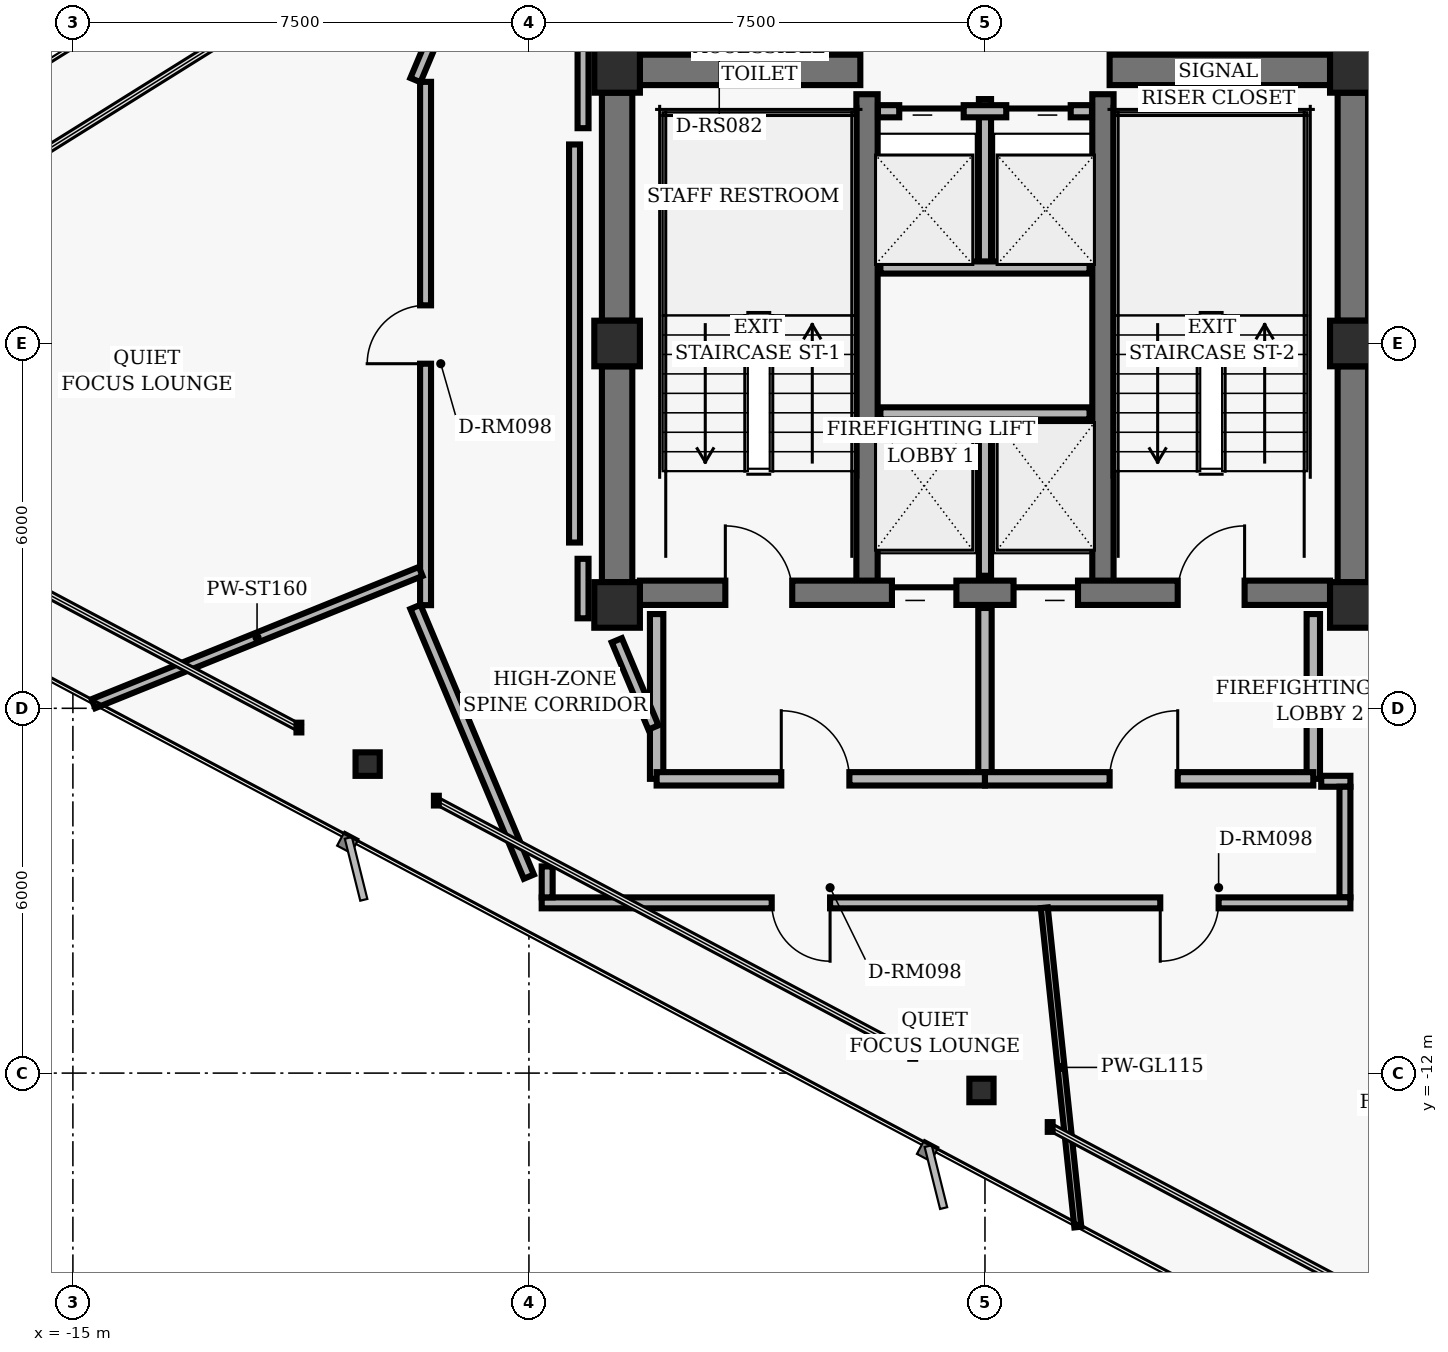
"""IFC4 building model, lengths in metres.
Left out: names, types, materials, properties, quantities, classifications, styles, units other than length and angle.
Written with IfcOpenShell. Run it as: python <this file> out.ifc"""

import sys

from ifc_helpers import new_model, si_unit, direction, frame, frame_2d, origin, origin_2d, place, context, subcontext, project, spatial, rectangle, hollow_rectangle, i_section, extrude, element, fill, save


model = new_model("IFC4")
c1 = context("Model", 3, precision=1e-05, world=origin(), true_north=direction((0.0, 1.0)))
c2 = subcontext(c1, "Body", "Model", "MODEL_VIEW")
j1 = project(units=[si_unit("LENGTHUNIT", "METRE"), si_unit("PLANEANGLEUNIT", "RADIAN")], contexts=[c1])
p1 = place(None, origin())
s1 = spatial("IfcSite", under=j1, at=p1, CompositionType="ELEMENT")
p2 = place(p1, origin())
s2 = spatial("IfcBuilding", under=s1, at=p2, CompositionType="ELEMENT")
p3 = place(p2, frame((0.0, 0.0, 202.72)))
s3 = spatial("IfcBuildingStorey", under=s2, at=p3, CompositionType="ELEMENT", Elevation=202.72)
for number, where, z_axis, x_axis in (
    (1, (-6.05, 4.5, 0.0), (0.0, 0.0, 1.0), (1.0, 0.0, 0.0)),
    (2, (6.05, 4.5, 0.0), (0.0, 0.0, 1.0), (1.0, 0.0, 0.0)),
    (3, (-6.05, 0.0, 0.0), (0.0, 0.0, 1.0), (1.0, 0.0, 0.0)),
    (4, (6.05, 0.0, 0.0), (0.0, 0.0, 1.0), (1.0, 0.0, 0.0)),
    (5, (-6.05, -4.3, 0.0), (0.0, 0.0, 1.0), (1.0, 0.0, 0.0)),
    (6, (6.05, -4.3, 0.0), (0.0, 0.0, 1.0), (1.0, 0.0, 0.0)),
):
    element("IfcColumn", number, at=place(p3, frame(where, z_axis=z_axis, x_axis=x_axis)), inside=s3, PredefinedType="COLUMN", context=c2, shape_type="SweptSolid", body=[
        extrude(hollow_rectangle(XDim=0.75, YDim=0.75, WallThickness=0.05, InnerFilletRadius=0.02, OuterFilletRadius=0.04, at=origin_2d()), origin(), (0.0, 0.0, 1.0), 3.04),
    ])
p4 = place(p3, frame((-6.05, 0.375, 0.0), z_axis=(0.0, 0.0, 1.0), x_axis=(0.0, 1.0, 0.0)))
e7 = element("IfcWall", 7, at=p4, inside=s3, PredefinedType="SHEAR", context=c2, shape_type="SweptSolid", body=[
    extrude(rectangle(XDim=3.75, YDim=0.5, at=frame_2d((1.875, 0.0))), origin(), (0.0, 0.0, 1.0), 2.798),
])
p5 = place(p3, frame((-6.05, -3.925, 0.0), z_axis=(0.0, 0.0, 1.0), x_axis=(0.0, 1.0, 0.0)))
e8 = element("IfcWall", 8, at=p5, inside=s3, PredefinedType="SHEAR", context=c2, shape_type="SweptSolid", body=[
    extrude(rectangle(XDim=3.55, YDim=0.5, at=frame_2d((1.775, 0.0))), origin(), (0.0, 0.0, 1.0), 2.798),
])
p6 = place(p3, frame((6.05, 0.375, 0.0), z_axis=(0.0, 0.0, 1.0), x_axis=(0.0, 1.0, 0.0)))
e9 = element("IfcWall", 9, at=p6, inside=s3, PredefinedType="SHEAR", context=c2, shape_type="SweptSolid", body=[
    extrude(rectangle(XDim=3.75, YDim=0.5, at=frame_2d((1.875, 0.0))), origin(), (0.0, 0.0, 1.0), 2.798),
])
p7 = place(p3, frame((6.05, -3.925, 0.0), z_axis=(0.0, 0.0, 1.0), x_axis=(0.0, 1.0, 0.0)))
e10 = element("IfcWall", 10, at=p7, inside=s3, PredefinedType="SHEAR", context=c2, shape_type="SweptSolid", body=[
    extrude(rectangle(XDim=3.55, YDim=0.5, at=frame_2d((1.775, 0.0))), origin(), (0.0, 0.0, 1.0), 2.798),
])
for number, where, z_axis, x_axis in (
    (11, (-1.94, -4.1, 0.0), (0.0, 0.0, 1.0), (0.0, 1.0, 0.0)),
    (12, (1.94, -4.1, 0.0), (0.0, 0.0, 1.0), (0.0, 1.0, 0.0)),
):
    element("IfcWall", number, at=place(p3, frame(where, z_axis=z_axis, x_axis=x_axis)), inside=s3, PredefinedType="SHEAR", context=c2, shape_type="SweptSolid", body=[
        extrude(rectangle(XDim=8.2, YDim=0.35, at=frame_2d((4.1, 0.0))), origin(), (0.0, 0.0, 1.0), 2.798),
    ])
p8 = place(p3, frame((-5.675, -4.1, 0.0), z_axis=(0.0, 0.0, 1.0), x_axis=(1.0, 0.0, 0.0)))
e13 = element("IfcWall", 13, at=p8, inside=s3, PredefinedType="SHEAR", context=c2, shape_type="SweptSolid", body=[
    extrude(rectangle(XDim=11.35, YDim=0.4, at=frame_2d((5.675, 0.0))), origin(), (0.0, 0.0, 1.0), 2.798),
])
p9 = place(p8, frame((1.405, 0.0, 0.0)))
e14 = element("IfcOpeningElement", 14, at=p9, cuts=e13, PredefinedType="OPENING", context=c2, shape_type="SweptSolid", body=[
    extrude(rectangle(XDim=1.1, YDim=2.04, at=frame_2d((0.55, 1.02))), frame((0.0, 0.21, 0.0), z_axis=(0.0, -1.0, 0.0), x_axis=(1.0, 0.0, 0.0)), (0.0, 0.0, 1.0), 0.42),
])
p10 = place(p8, frame((8.845, 0.0, 0.0)))
e15 = element("IfcOpeningElement", 15, at=p10, cuts=e13, PredefinedType="OPENING", context=c2, shape_type="SweptSolid", body=[
    extrude(rectangle(XDim=1.1, YDim=2.04, at=frame_2d((0.55, 1.02))), frame((0.0, 0.21, 0.0), z_axis=(0.0, -1.0, 0.0), x_axis=(1.0, 0.0, 0.0)), (0.0, 0.0, 1.0), 0.42),
])
p11 = place(p8, frame((4.145, 0.0, 0.0)))
e16 = element("IfcOpeningElement", 16, at=p11, cuts=e13, PredefinedType="OPENING", context=c2, shape_type="SweptSolid", body=[
    extrude(rectangle(XDim=1.06, YDim=2.04, at=frame_2d((0.53, 1.02))), frame((0.0, 0.21, 0.0), z_axis=(0.0, -1.0, 0.0), x_axis=(1.0, 0.0, 0.0)), (0.0, 0.0, 1.0), 0.42),
])
p12 = place(p8, frame((6.145, 0.0, 0.0)))
e17 = element("IfcOpeningElement", 17, at=p12, cuts=e13, PredefinedType="OPENING", context=c2, shape_type="SweptSolid", body=[
    extrude(rectangle(XDim=1.06, YDim=2.04, at=frame_2d((0.53, 1.02))), frame((0.0, 0.21, 0.0), z_axis=(0.0, -1.0, 0.0), x_axis=(1.0, 0.0, 0.0)), (0.0, 0.0, 1.0), 0.42),
])
for number, where, z_axis, x_axis in (
    (18, (-5.675, 4.5, 0.0), (0.0, 0.0, 1.0), (1.0, 0.0, 0.0)),
    (19, (2.05, 4.5, 0.0), (0.0, 0.0, 1.0), (1.0, 0.0, 0.0)),
):
    element("IfcWall", number, at=place(p3, frame(where, z_axis=z_axis, x_axis=x_axis)), inside=s3, PredefinedType="SHEAR", context=c2, shape_type="SweptSolid", body=[
        extrude(rectangle(XDim=3.625, YDim=0.5, at=frame_2d((1.812, 0.0))), origin(), (0.0, 0.0, 1.0), 2.798),
    ])
for number, where, z_axis, x_axis in (
    (20, (-10.153, -6.918, 0.0), (0.0, 0.0, 1.0), (1.0, 0.0, 0.0)),
    (21, (-0.058, -12.285, 0.0), (0.0, 0.0, 1.0), (1.0, 0.0, 0.0)),
):
    element("IfcColumn", number, at=place(p3, frame(where, z_axis=z_axis, x_axis=x_axis)), inside=s3, PredefinedType="COLUMN", context=c2, shape_type="SweptSolid", body=[
        extrude(i_section(OverallWidth=0.398, OverallDepth=0.387, WebThickness=0.021, FlangeThickness=0.033, FilletRadius=0.018, at=origin_2d()), origin(), (0.0, 0.0, 1.0), 3.04),
    ])
p13 = place(p3, frame((0.0, -3.82, 0.0), z_axis=(0.0, 0.0, 1.0), x_axis=(0.0, 1.0, 0.0)))
e22 = element("IfcWall", 22, at=p13, inside=s3, PredefinedType="PARTITIONING", context=c2, shape_type="SweptSolid", body=[
    extrude(rectangle(XDim=2.67, YDim=0.2, at=frame_2d((1.335, 0.0))), origin(), (0.0, 0.0, 1.0), 2.773),
])
p14 = place(p3, frame((-1.72, -1.15, 0.0), z_axis=(0.0, 0.0, 1.0), x_axis=(1.0, 0.0, 0.0)))
e23 = element("IfcWall", 23, at=p14, inside=s3, PredefinedType="PARTITIONING", context=c2, shape_type="SweptSolid", body=[
    extrude(rectangle(XDim=3.44, YDim=0.2, at=frame_2d((1.72, 0.0))), origin(), (0.0, 0.0, 1.0), 2.773),
])
for number, where, z_axis, x_axis in (
    (24, (-5.4, -7.16, 0.0), (0.0, 0.0, 1.0), (0.0, 1.0, 0.0)),
    (25, (5.4, -7.16, 0.0), (0.0, 0.0, 1.0), (0.0, 1.0, 0.0)),
):
    element("IfcWall", number, at=place(p3, frame(where, z_axis=z_axis, x_axis=x_axis)), inside=s3, PredefinedType="PARTITIONING", context=c2, shape_type="SweptSolid", body=[
        extrude(rectangle(XDim=2.71, YDim=0.22, at=frame_2d((1.355, 0.0))), origin(), (0.0, 0.0, 1.0), 2.773),
    ])
p15 = place(p3, frame((0.0, -7.16, 0.0), z_axis=(0.0, 0.0, 1.0), x_axis=(0.0, 1.0, 0.0)))
e26 = element("IfcWall", 26, at=p15, inside=s3, PredefinedType="PARTITIONING", context=c2, shape_type="SweptSolid", body=[
    extrude(rectangle(XDim=2.81, YDim=0.22, at=frame_2d((1.405, 0.0))), origin(), (0.0, 0.0, 1.0), 2.773),
])
p16 = place(p3, frame((-5.4, -7.16, 0.0), z_axis=(0.0, 0.0, 1.0), x_axis=(1.0, 0.0, 0.0)))
e27 = element("IfcWall", 27, at=p16, inside=s3, PredefinedType="PARTITIONING", context=c2, shape_type="SweptSolid", body=[
    extrude(rectangle(XDim=5.4, YDim=0.22, at=frame_2d((2.7, 0.0))), origin(), (0.0, 0.0, 1.0), 2.395),
])
p17 = place(p16, frame((2.05, 0.0, 0.0)))
e28 = element("IfcOpeningElement", 28, at=p17, cuts=e27, PredefinedType="OPENING", context=c2, shape_type="SweptSolid", body=[
    extrude(rectangle(XDim=1.12, YDim=2.02, at=frame_2d((0.56, 1.01))), frame((0.0, 0.12, 0.0), z_axis=(0.0, -1.0, 0.0), x_axis=(1.0, 0.0, 0.0)), (0.0, 0.0, 1.0), 0.24),
])
p18 = place(p3, frame((0.0, -7.16, 0.0), z_axis=(0.0, 0.0, 1.0), x_axis=(1.0, 0.0, 0.0)))
e29 = element("IfcWall", 29, at=p18, inside=s3, PredefinedType="PARTITIONING", context=c2, shape_type="SweptSolid", body=[
    extrude(rectangle(XDim=5.4, YDim=0.22, at=frame_2d((2.7, 0.0))), origin(), (0.0, 0.0, 1.0), 2.773),
])
p19 = place(p18, frame((2.05, 0.0, 0.0)))
e30 = element("IfcOpeningElement", 30, at=p19, cuts=e29, PredefinedType="OPENING", context=c2, shape_type="SweptSolid", body=[
    extrude(rectangle(XDim=1.12, YDim=2.02, at=frame_2d((0.56, 1.01))), frame((0.0, 0.12, 0.0), z_axis=(0.0, -1.0, 0.0), x_axis=(1.0, 0.0, 0.0)), (0.0, 0.0, 1.0), 0.24),
])
p20 = place(p3, frame((0.0, 1.25, 0.0), z_axis=(0.0, 0.0, 1.0), x_axis=(0.0, 1.0, 0.0)))
e31 = element("IfcWall", 31, at=p20, inside=s3, PredefinedType="PARTITIONING", context=c2, shape_type="SweptSolid", body=[
    extrude(rectangle(XDim=2.77, YDim=0.2, at=frame_2d((1.385, 0.0))), origin(), (0.0, 0.0, 1.0), 2.773),
])
p21 = place(p3, frame((-1.72, 1.25, 0.0), z_axis=(0.0, 0.0, 1.0), x_axis=(1.0, 0.0, 0.0)))
e32 = element("IfcWall", 32, at=p21, inside=s3, PredefinedType="PARTITIONING", context=c2, shape_type="SweptSolid", body=[
    extrude(rectangle(XDim=3.44, YDim=0.2, at=frame_2d((1.72, 0.0))), origin(), (0.0, 0.0, 1.0), 2.773),
])
p22 = place(p3, frame((-1.76, 3.82, 0.0), z_axis=(0.0, 0.0, 1.0), x_axis=(1.0, 0.0, 0.0)))
e33 = element("IfcWall", 33, at=p22, inside=s3, PredefinedType="PARTITIONING", context=c2, shape_type="SweptSolid", body=[
    extrude(rectangle(XDim=3.52, YDim=0.2, at=frame_2d((1.76, 0.0))), origin(), (0.0, 0.0, 1.0), 2.773),
])
p23 = place(p22, frame((0.35, 0.0, 0.0)))
e34 = element("IfcOpeningElement", 34, at=p23, cuts=e33, PredefinedType="OPENING", context=c2, shape_type="SweptSolid", body=[
    extrude(rectangle(XDim=1.06, YDim=2.04, at=frame_2d((0.53, 1.02))), frame((0.0, 0.11, 0.0), z_axis=(0.0, -1.0, 0.0), x_axis=(1.0, 0.0, 0.0)), (0.0, 0.0, 1.0), 0.22),
])
p24 = place(p22, frame((2.11, 0.0, 0.0)))
e35 = element("IfcOpeningElement", 35, at=p24, cuts=e33, PredefinedType="OPENING", context=c2, shape_type="SweptSolid", body=[
    extrude(rectangle(XDim=1.06, YDim=2.04, at=frame_2d((0.53, 1.02))), frame((0.0, 0.11, 0.0), z_axis=(0.0, -1.0, 0.0), x_axis=(1.0, 0.0, 0.0)), (0.0, 0.0, 1.0), 0.22),
])
p25 = place(p3, frame((-7.501, -8.769, 0.0), z_axis=(0.0, 0.0, 1.0), x_axis=(-0.387573945081, 0.921838617706, 0.0)))
e36 = element("IfcWall", 36, at=p25, inside=s3, PredefinedType="PARTITIONING", context=c2, shape_type="SweptSolid", body=[
    extrude(rectangle(XDim=4.813, YDim=0.18, at=frame_2d((2.407, 0.0))), origin(), (0.0, 0.0, 1.0), 2.773),
])
p26 = place(p3, frame((-9.2, -4.303, 0.0), z_axis=(0.0, 0.0, 1.0), x_axis=(0.0, 1.0, 0.0)))
e37 = element("IfcWall", 37, at=p26, inside=s3, PredefinedType="PARTITIONING", context=c2, shape_type="SweptSolid", body=[
    extrude(rectangle(XDim=8.607, YDim=0.18, at=frame_2d((4.303, 0.0))), origin(), (0.0, 0.0, 1.0), 2.773),
])
p27 = place(p26, frame((3.971, 0.0, 0.0)))
e38 = element("IfcOpeningElement", 38, at=p27, cuts=e37, PredefinedType="OPENING", context=c2, shape_type="SweptSolid", body=[
    extrude(rectangle(XDim=0.96, YDim=2.02, at=frame_2d((0.48, 1.01))), frame((0.0, 0.1, 0.0), z_axis=(0.0, -1.0, 0.0), x_axis=(1.0, 0.0, 0.0)), (0.0, 0.0, 1.0), 0.2),
])
p28 = place(p3, frame((-9.367, 4.332, 0.0), z_axis=(0.0, 0.0, 1.0), x_axis=(0.387573945081, 0.921838617706, 0.0)))
e39 = element("IfcWall", 39, at=p28, inside=s3, PredefinedType="PARTITIONING", context=c2, shape_type="SweptSolid", body=[
    extrude(rectangle(XDim=4.813, YDim=0.18, at=frame_2d((2.407, 0.0))), origin(), (0.0, 0.0, 1.0), 2.773),
])
p29 = place(p3, frame((-6.61, 4.94, 0.0), z_axis=(0.0, 0.0, 1.0), x_axis=(0.0, -1.0, 0.0)))
e40 = element("IfcWall", 40, at=p29, inside=s3, PredefinedType="PARTITIONING", context=c2, shape_type="SweptSolid", body=[
    extrude(rectangle(XDim=1.399, YDim=0.18, at=frame_2d((0.699, 0.0))), origin(), (0.0, 0.0, 1.0), 2.773),
])
p30 = place(p3, frame((-6.75, 3.273, 0.0), z_axis=(0.0, 0.0, 1.0), x_axis=(0.0, -1.0, 0.0)))
e41 = element("IfcWall", 41, at=p30, inside=s3, PredefinedType="PARTITIONING", context=c2, shape_type="SweptSolid", body=[
    extrude(rectangle(XDim=6.547, YDim=0.18, at=frame_2d((3.273, 0.0))), origin(), (0.0, 0.0, 1.0), 2.773),
])
p31 = place(p3, frame((-6.61, -3.541, 0.0), z_axis=(0.0, 0.0, 1.0), x_axis=(0.0, -1.0, 0.0)))
e42 = element("IfcWall", 42, at=p31, inside=s3, PredefinedType="PARTITIONING", context=c2, shape_type="SweptSolid", body=[
    extrude(rectangle(XDim=0.979, YDim=0.18, at=frame_2d((0.489, 0.0))), origin(), (0.0, 0.0, 1.0), 2.773),
])
p32 = place(p3, frame((-6.055, -4.882, 0.0), z_axis=(0.0, 0.0, 1.0), x_axis=(0.387579540458, -0.921836265189, 0.0)))
e43 = element("IfcWall", 43, at=p32, inside=s3, PredefinedType="PARTITIONING", context=c2, shape_type="SweptSolid", body=[
    extrude(rectangle(XDim=1.555, YDim=0.18, at=frame_2d((0.777, 0.0))), origin(), (0.0, 0.0, 1.0), 2.253),
])
p33 = place(p3, frame((5.53, -7.2, 0.0), z_axis=(0.0, 0.0, 1.0), x_axis=(1.0, 0.0, 0.0)))
e44 = element("IfcWall", 44, at=p33, inside=s3, PredefinedType="PARTITIONING", context=c2, shape_type="SweptSolid", body=[
    extrude(rectangle(XDim=0.48, YDim=0.18, at=frame_2d((0.24, 0.0))), origin(), (0.0, 0.0, 1.0), 2.773),
])
p34 = place(p3, frame((5.92, -7.29, 0.0), z_axis=(0.0, 0.0, 1.0), x_axis=(0.0, -1.0, 0.0)))
e45 = element("IfcWall", 45, at=p34, inside=s3, PredefinedType="PARTITIONING", context=c2, shape_type="SweptSolid", body=[
    extrude(rectangle(XDim=1.82, YDim=0.18, at=frame_2d((0.91, 0.0))), origin(), (0.0, 0.0, 1.0), 2.773),
])
p35 = place(p3, frame((6.01, -9.2, 0.0), z_axis=(0.0, 0.0, 1.0), x_axis=(-1.0, 0.0, 0.0)))
e46 = element("IfcWall", 46, at=p35, inside=s3, PredefinedType="PARTITIONING", context=c2, shape_type="SweptSolid", body=[
    extrude(rectangle(XDim=13.3, YDim=0.18, at=frame_2d((6.65, 0.0))), origin(), (0.0, 0.0, 1.0), 2.395),
])
p36 = place(p35, frame((8.557, 0.0, 0.0)))
e47 = element("IfcOpeningElement", 47, at=p36, cuts=e46, PredefinedType="OPENING", context=c2, shape_type="SweptSolid", body=[
    extrude(rectangle(XDim=0.96, YDim=2.02, at=frame_2d((0.48, 1.01))), frame((0.0, 0.1, 0.0), z_axis=(0.0, -1.0, 0.0), x_axis=(1.0, 0.0, 0.0)), (0.0, 0.0, 1.0), 0.2),
])
p37 = place(p35, frame((2.167, 0.0, 0.0)))
e48 = element("IfcOpeningElement", 48, at=p37, cuts=e46, PredefinedType="OPENING", context=c2, shape_type="SweptSolid", body=[
    extrude(rectangle(XDim=0.96, YDim=2.02, at=frame_2d((0.48, 1.01))), frame((0.0, 0.1, 0.0), z_axis=(0.0, -1.0, 0.0), x_axis=(1.0, 0.0, 0.0)), (0.0, 0.0, 1.0), 0.2),
])
p38 = place(p3, frame((-7.2, -9.11, 0.0), z_axis=(0.0, 0.0, 1.0), x_axis=(0.0, 1.0, 0.0)))
e49 = element("IfcWall", 49, at=p38, inside=s3, PredefinedType="PARTITIONING", context=c2, shape_type="SweptSolid", body=[
    extrude(rectangle(XDim=0.51, YDim=0.18, at=frame_2d((0.255, 0.0))), origin(), (0.0, 0.0, 1.0), 2.773),
])
p39 = place(p3, frame((-9.28, -3.75, 0.0), z_axis=(0.0, 0.0, 1.0), x_axis=(-0.927192124848, -0.374586123102, 0.0)))
e50 = element("IfcWall", 50, at=p39, inside=s3, PredefinedType="PARTITIONING", context=c2, shape_type="SweptSolid", body=[
    extrude(rectangle(XDim=5.805, YDim=0.16, at=frame_2d((2.903, 0.0))), origin(), (0.0, 0.0, 1.0), 2.773),
])
p40 = place(p3, frame((0.975, -9.28, 0.0), z_axis=(0.0, 0.0, 1.0), x_axis=(0.104518746602, -0.994522916583, 0.0)))
e51 = element("IfcWall", 51, at=p40, inside=s3, PredefinedType="MOVABLE", context=c2, shape_type="SweptSolid", body=[
    extrude(rectangle(XDim=5.281, YDim=0.115, at=frame_2d((2.641, 0.0))), origin(), (0.0, 0.0, 1.0), 2.773),
])
p41 = place(p9, origin())
e52 = element("IfcDoor", 52, at=p41, inside=s3, OperationType="SINGLE_SWING_LEFT", PredefinedType="DOOR", context=c2, shape_type="SweptSolid", body=[
    extrude(rectangle(XDim=1.1, YDim=2.04, at=frame_2d((0.55, 1.02))), frame((0.0, 0.025, 0.0), z_axis=(0.0, -1.0, 0.0), x_axis=(1.0, 0.0, 0.0)), (0.0, 0.0, 1.0), 0.05),
])
fill(e14, e52)
p42 = place(p10, origin())
e53 = element("IfcDoor", 53, at=p42, inside=s3, OperationType="SINGLE_SWING_RIGHT", PredefinedType="DOOR", context=c2, shape_type="SweptSolid", body=[
    extrude(rectangle(XDim=1.1, YDim=2.04, at=frame_2d((0.55, 1.02))), frame((0.0, 0.025, 0.0), z_axis=(0.0, -1.0, 0.0), x_axis=(1.0, 0.0, 0.0)), (0.0, 0.0, 1.0), 0.05),
])
fill(e15, e53)
p43 = place(p11, origin())
e54 = element("IfcDoor", 54, at=p43, inside=s3, OperationType="SLIDING_TO_LEFT", PredefinedType="DOOR", context=c2, shape_type="SweptSolid", body=[
    extrude(rectangle(XDim=1.06, YDim=2.04, at=frame_2d((0.53, 1.02))), frame((0.0, 0.025, 0.0), z_axis=(0.0, -1.0, 0.0), x_axis=(1.0, 0.0, 0.0)), (0.0, 0.0, 1.0), 0.05),
])
fill(e16, e54)
p44 = place(p12, origin())
e55 = element("IfcDoor", 55, at=p44, inside=s3, OperationType="SLIDING_TO_RIGHT", PredefinedType="DOOR", context=c2, shape_type="SweptSolid", body=[
    extrude(rectangle(XDim=1.06, YDim=2.04, at=frame_2d((0.53, 1.02))), frame((0.0, 0.025, 0.0), z_axis=(0.0, -1.0, 0.0), x_axis=(1.0, 0.0, 0.0)), (0.0, 0.0, 1.0), 0.05),
])
fill(e17, e55)
p45 = place(p17, origin())
e56 = element("IfcDoor", 56, at=p45, inside=s3, OperationType="SINGLE_SWING_LEFT", PredefinedType="DOOR", context=c2, shape_type="SweptSolid", body=[
    extrude(rectangle(XDim=1.12, YDim=2.02, at=frame_2d((0.56, 1.01))), frame((0.0, 0.025, 0.0), z_axis=(0.0, -1.0, 0.0), x_axis=(1.0, 0.0, 0.0)), (0.0, 0.0, 1.0), 0.05),
])
fill(e28, e56)
p46 = place(p19, origin())
e57 = element("IfcDoor", 57, at=p46, inside=s3, OperationType="SINGLE_SWING_RIGHT", PredefinedType="DOOR", context=c2, shape_type="SweptSolid", body=[
    extrude(rectangle(XDim=1.12, YDim=2.02, at=frame_2d((0.56, 1.01))), frame((0.0, 0.025, 0.0), z_axis=(0.0, -1.0, 0.0), x_axis=(1.0, 0.0, 0.0)), (0.0, 0.0, 1.0), 0.05),
])
fill(e30, e57)
p47 = place(p23, origin())
e58 = element("IfcDoor", 58, at=p47, inside=s3, OperationType="SLIDING_TO_LEFT", PredefinedType="DOOR", context=c2, shape_type="SweptSolid", body=[
    extrude(rectangle(XDim=1.06, YDim=2.04, at=frame_2d((0.53, 1.02))), frame((0.0, 0.025, 0.0), z_axis=(0.0, -1.0, 0.0), x_axis=(1.0, 0.0, 0.0)), (0.0, 0.0, 1.0), 0.05),
])
fill(e34, e58)
p48 = place(p24, origin())
e59 = element("IfcDoor", 59, at=p48, inside=s3, OperationType="SLIDING_TO_RIGHT", PredefinedType="DOOR", context=c2, shape_type="SweptSolid", body=[
    extrude(rectangle(XDim=1.06, YDim=2.04, at=frame_2d((0.53, 1.02))), frame((0.0, 0.025, 0.0), z_axis=(0.0, -1.0, 0.0), x_axis=(1.0, 0.0, 0.0)), (0.0, 0.0, 1.0), 0.05),
])
fill(e35, e59)
p49 = place(p36, origin())
e60 = element("IfcDoor", 60, at=p49, inside=s3, OperationType="SINGLE_SWING_LEFT", PredefinedType="DOOR", context=c2, shape_type="SweptSolid", body=[
    extrude(rectangle(XDim=0.96, YDim=2.02, at=frame_2d((0.48, 1.01))), frame((0.0, 0.025, 0.0), z_axis=(0.0, -1.0, 0.0), x_axis=(1.0, 0.0, 0.0)), (0.0, 0.0, 1.0), 0.05),
])
fill(e47, e60)
p50 = place(p37, origin())
e61 = element("IfcDoor", 61, at=p50, inside=s3, OperationType="SINGLE_SWING_RIGHT", PredefinedType="DOOR", context=c2, shape_type="SweptSolid", body=[
    extrude(rectangle(XDim=0.96, YDim=2.02, at=frame_2d((0.48, 1.01))), frame((0.0, 0.025, 0.0), z_axis=(0.0, -1.0, 0.0), x_axis=(1.0, 0.0, 0.0)), (0.0, 0.0, 1.0), 0.05),
])
fill(e48, e61)
p51 = place(p27, origin())
e62 = element("IfcDoor", 62, at=p51, inside=s3, OperationType="SINGLE_SWING_LEFT", PredefinedType="DOOR", context=c2, shape_type="SweptSolid", body=[
    extrude(rectangle(XDim=0.96, YDim=2.02, at=frame_2d((0.48, 1.01))), frame((0.0, 0.025, 0.0), z_axis=(0.0, -1.0, 0.0), x_axis=(1.0, 0.0, 0.0)), (0.0, 0.0, 1.0), 0.05),
])
fill(e38, e62)
save(model, sys.argv[1])
